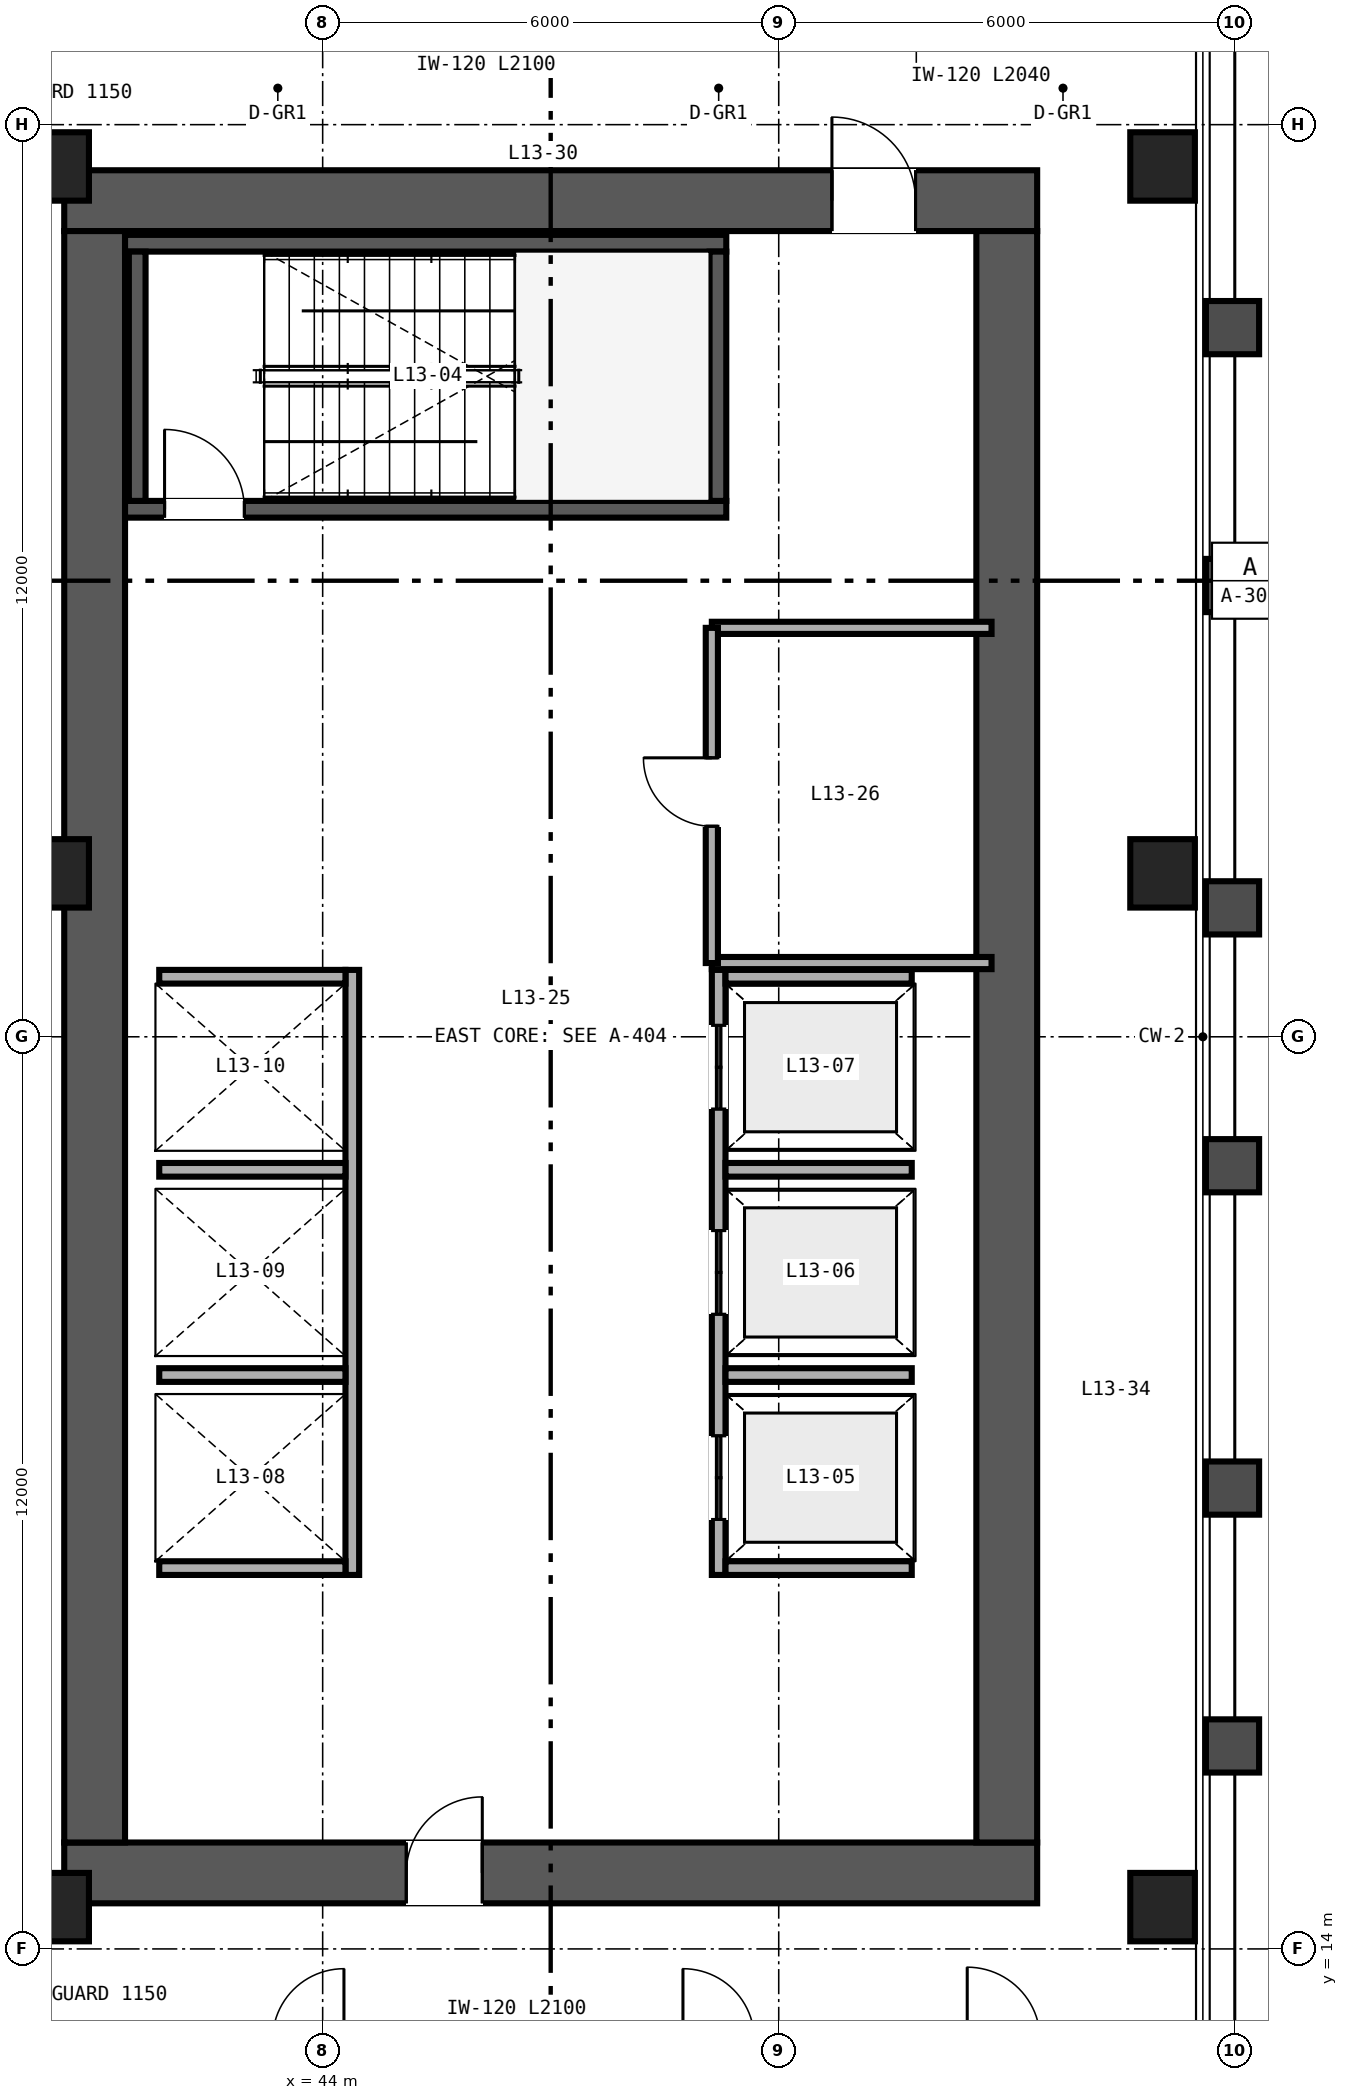
"""IFC4 building model, lengths in metres.
Left out: names, types, materials, properties, quantities, classifications, styles, units other than length and angle.
Written with IfcOpenShell. Run it as: python <this file> out.ifc"""

import sys

from ifc_helpers import new_model, si_unit, direction, frame, frame_2d, origin, origin_2d, place, context, subcontext, project, spatial, rectangle, hollow_rectangle, extrude, source, transform, mapped, element, fill, save


model = new_model("IFC4")
c1 = context("Model", 3, precision=1e-05, world=origin(), true_north=direction((0.0, 1.0)))
c2 = subcontext(c1, "Body", "Model", "MODEL_VIEW")
j1 = project(units=[si_unit("LENGTHUNIT", "METRE"), si_unit("PLANEANGLEUNIT", "RADIAN")], contexts=[c1])
p1 = place(None, origin())
s1 = spatial("IfcSite", under=j1, at=p1, CompositionType="ELEMENT")
p2 = place(p1, origin())
s2 = spatial("IfcBuilding", under=s1, at=p2, CompositionType="ELEMENT")
p3 = place(p2, frame((0.0, 0.0, 56.4)))
s3 = spatial("IfcBuildingStorey", under=s2, at=p3, CompositionType="ELEMENT", Elevation=56.4)
p4 = place(p3, frame((40.6, 15.0, 0.0), z_axis=(0.0, 0.0, 1.0), x_axis=(1.0, 0.0, 0.0)))
e1 = element("IfcWall", 1, at=p4, inside=s3, PredefinedType="SHEAR", context=c2, shape_type="SweptSolid", body=[
    extrude(rectangle(XDim=12.8, YDim=0.8, at=frame_2d((6.4, 0.0))), origin(), (0.0, 0.0, 1.0), 3.35),
])
p5 = place(p4, frame((4.5, 0.0, 0.0)))
e2 = element("IfcOpeningElement", 2, at=p5, cuts=e1, PredefinedType="OPENING", context=c2, shape_type="SweptSolid", body=[
    extrude(rectangle(XDim=1.0, YDim=2.15, at=frame_2d((0.5, 1.075))), frame((0.0, 0.41, 0.0), z_axis=(0.0, -1.0, 0.0), x_axis=(1.0, 0.0, 0.0)), (0.0, 0.0, 1.0), 0.82),
])
p6 = place(p3, frame((40.6, 37.0, 0.0), z_axis=(0.0, 0.0, 1.0), x_axis=(1.0, 0.0, 0.0)))
e3 = element("IfcWall", 3, at=p6, inside=s3, PredefinedType="SHEAR", context=c2, shape_type="SweptSolid", body=[
    extrude(rectangle(XDim=12.8, YDim=0.8, at=frame_2d((6.4, 0.0))), origin(), (0.0, 0.0, 1.0), 3.35),
])
p7 = place(p6, frame((10.1, 0.0, 0.0)))
e4 = element("IfcOpeningElement", 4, at=p7, cuts=e3, PredefinedType="OPENING", context=c2, shape_type="SweptSolid", body=[
    extrude(rectangle(XDim=1.1, YDim=2.15, at=frame_2d((0.55, 1.075))), frame((0.0, 0.41, 0.0), z_axis=(0.0, -1.0, 0.0), x_axis=(1.0, 0.0, 0.0)), (0.0, 0.0, 1.0), 0.82),
])
for number, where, z_axis, x_axis in (
    (5, (41.0, 15.4, 0.0), (0.0, 0.0, 1.0), (0.0, 1.0, 0.0)),
    (6, (53.0, 15.4, 0.0), (0.0, 0.0, 1.0), (0.0, 1.0, 0.0)),
):
    element("IfcWall", number, at=place(p3, frame(where, z_axis=z_axis, x_axis=x_axis)), inside=s3, PredefinedType="SHEAR", context=c2, shape_type="SweptSolid", body=[
        extrude(rectangle(XDim=21.2, YDim=0.8, at=frame_2d((10.6, 0.0))), origin(), (0.0, 0.0, 1.0), 3.35),
    ])
p8 = place(p3, frame((41.4, 32.94, 0.0), z_axis=(0.0, 0.0, 1.0), x_axis=(1.0, 0.0, 0.0)))
e7 = element("IfcWall", 7, at=p8, inside=s3, PredefinedType="SHEAR", context=c2, shape_type="SweptSolid", body=[
    extrude(rectangle(XDim=7.91, YDim=0.22, at=frame_2d((3.955, 0.0))), origin(), (0.0, 0.0, 1.0), 3.4),
])
p9 = place(p8, frame((0.52, 0.0, 0.0)))
e8 = element("IfcOpeningElement", 8, at=p9, cuts=e7, PredefinedType="OPENING", context=c2, shape_type="SweptSolid", body=[
    extrude(rectangle(XDim=1.05, YDim=2.15, at=frame_2d((0.525, 1.075))), frame((0.0, 0.12, 0.0), z_axis=(0.0, -1.0, 0.0), x_axis=(1.0, 0.0, 0.0)), (0.0, 0.0, 1.0), 0.24),
])
p10 = place(p3, frame((41.4, 36.44, 0.0), z_axis=(0.0, 0.0, 1.0), x_axis=(1.0, 0.0, 0.0)))
e9 = element("IfcWall", 9, at=p10, inside=s3, PredefinedType="SHEAR", context=c2, shape_type="SweptSolid", body=[
    extrude(rectangle(XDim=7.91, YDim=0.22, at=frame_2d((3.955, 0.0))), origin(), (0.0, 0.0, 1.0), 3.4),
])
for number, where, z_axis, x_axis in (
    (10, (41.56, 33.05, 0.0), (0.0, 0.0, 1.0), (0.0, 1.0, 0.0)),
    (11, (49.2, 33.05, 0.0), (0.0, 0.0, 1.0), (0.0, 1.0, 0.0)),
):
    element("IfcWall", number, at=place(p3, frame(where, z_axis=z_axis, x_axis=x_axis)), inside=s3, PredefinedType="SHEAR", context=c2, shape_type="SweptSolid", body=[
        extrude(rectangle(XDim=3.28, YDim=0.22, at=frame_2d((1.64, 0.0))), origin(), (0.0, 0.0, 1.0), 3.4),
    ])
m1 = source(origin(), c2, "Body", "SweptSolid", [
    extrude(hollow_rectangle(XDim=0.85, YDim=0.9, WallThickness=0.04, at=origin_2d()), origin(), (0.0, 0.0, 1.0), 3.35),
])
for number, where, z_axis, x_axis in (
    (12, (40.5, 14.55, 0.0), (0.0, 0.0, 1.0), (1.0, 0.0, 0.0)),
    (13, (55.05, 14.55, 0.0), (0.0, 0.0, 1.0), (1.0, 0.0, 0.0)),
    (14, (40.5, 28.15, 0.0), (0.0, 0.0, 1.0), (1.0, 0.0, 0.0)),
    (15, (55.05, 28.15, 0.0), (0.0, 0.0, 1.0), (1.0, 0.0, 0.0)),
    (16, (40.5, 37.45, 0.0), (0.0, 0.0, 1.0), (1.0, 0.0, 0.0)),
    (17, (55.05, 37.45, 0.0), (0.0, 0.0, 1.0), (1.0, 0.0, 0.0)),
):
    element("IfcColumn", number, at=place(p3, frame(where, z_axis=z_axis, x_axis=x_axis)), inside=s3, PredefinedType="COLUMN", context=c2, shape_type="MappedRepresentation", body=[
        mapped(m1, transform((0.0, 0.0, 0.0), scale=1.0)),
    ])
p11 = place(p3, frame((49.21, 18.92, 0.0), z_axis=(0.0, 0.0, 1.0), x_axis=(0.0, 1.0, 0.0)))
e18 = element("IfcWall", 18, at=p11, inside=s3, PredefinedType="SOLIDWALL", context=c2, shape_type="SweptSolid", body=[
    extrude(rectangle(XDim=7.96, YDim=0.18, at=frame_2d((3.98, 0.0))), origin(), (0.0, 0.0, 1.0), 3.35),
])
p12 = place(p11, frame((0.73, 0.0, 0.0)))
e19 = element("IfcOpeningElement", 19, at=p12, cuts=e18, PredefinedType="OPENING", context=c2, shape_type="SweptSolid", body=[
    extrude(rectangle(XDim=1.1, YDim=2.2, at=frame_2d((0.55, 1.1))), frame((0.0, 0.1, 0.0), z_axis=(0.0, -1.0, 0.0), x_axis=(1.0, 0.0, 0.0)), (0.0, 0.0, 1.0), 0.2),
])
p13 = place(p11, frame((3.43, 0.0, 0.0)))
e20 = element("IfcOpeningElement", 20, at=p13, cuts=e18, PredefinedType="OPENING", context=c2, shape_type="SweptSolid", body=[
    extrude(rectangle(XDim=1.1, YDim=2.2, at=frame_2d((0.55, 1.1))), frame((0.0, 0.1, 0.0), z_axis=(0.0, -1.0, 0.0), x_axis=(1.0, 0.0, 0.0)), (0.0, 0.0, 1.0), 0.2),
])
p14 = place(p11, frame((6.13, 0.0, 0.0)))
e21 = element("IfcOpeningElement", 21, at=p14, cuts=e18, PredefinedType="OPENING", context=c2, shape_type="SweptSolid", body=[
    extrude(rectangle(XDim=1.1, YDim=2.2, at=frame_2d((0.55, 1.1))), frame((0.0, 0.1, 0.0), z_axis=(0.0, -1.0, 0.0), x_axis=(1.0, 0.0, 0.0)), (0.0, 0.0, 1.0), 0.2),
])
for number, where, z_axis, x_axis in (
    (22, (49.3, 19.01, 0.0), (0.0, 0.0, 1.0), (1.0, 0.0, 0.0)),
    (23, (49.3, 26.79, 0.0), (0.0, 0.0, 1.0), (1.0, 0.0, 0.0)),
    (24, (49.3, 21.55, 0.0), (0.0, 0.0, 1.0), (1.0, 0.0, 0.0)),
    (25, (49.3, 24.25, 0.0), (0.0, 0.0, 1.0), (1.0, 0.0, 0.0)),
):
    element("IfcWall", number, at=place(p3, frame(where, z_axis=z_axis, x_axis=x_axis)), inside=s3, PredefinedType="SOLIDWALL", context=c2, shape_type="SweptSolid", body=[
        extrude(rectangle(XDim=2.45, YDim=0.18, at=frame_2d((1.225, 0.0))), origin(), (0.0, 0.0, 1.0), 3.35),
    ])
p15 = place(p3, frame((44.39, 18.92, 0.0), z_axis=(0.0, 0.0, 1.0), x_axis=(0.0, 1.0, 0.0)))
e26 = element("IfcWall", 26, at=p15, inside=s3, PredefinedType="SOLIDWALL", context=c2, shape_type="SweptSolid", body=[
    extrude(rectangle(XDim=7.96, YDim=0.18, at=frame_2d((3.98, 0.0))), origin(), (0.0, 0.0, 1.0), 3.35),
])
for number, where, z_axis, x_axis in (
    (27, (41.85, 19.01, 0.0), (0.0, 0.0, 1.0), (1.0, 0.0, 0.0)),
    (28, (41.85, 26.79, 0.0), (0.0, 0.0, 1.0), (1.0, 0.0, 0.0)),
    (29, (41.85, 21.55, 0.0), (0.0, 0.0, 1.0), (1.0, 0.0, 0.0)),
    (30, (41.85, 24.25, 0.0), (0.0, 0.0, 1.0), (1.0, 0.0, 0.0)),
):
    element("IfcWall", number, at=place(p3, frame(where, z_axis=z_axis, x_axis=x_axis)), inside=s3, PredefinedType="SOLIDWALL", context=c2, shape_type="SweptSolid", body=[
        extrude(rectangle(XDim=2.45, YDim=0.18, at=frame_2d((1.225, 0.0))), origin(), (0.0, 0.0, 1.0), 3.35),
    ])
p16 = place(p3, frame((49.12, 26.97, 0.0), z_axis=(0.0, 0.0, 1.0), x_axis=(1.0, 0.0, 0.0)))
e31 = element("IfcWall", 31, at=p16, inside=s3, PredefinedType="PARTITIONING", context=c2, shape_type="SweptSolid", body=[
    extrude(rectangle(XDim=3.68, YDim=0.16, at=frame_2d((1.84, 0.0))), origin(), (0.0, 0.0, 1.0), 3.35),
])
p17 = place(p3, frame((49.12, 31.38, 0.0), z_axis=(0.0, 0.0, 1.0), x_axis=(1.0, 0.0, 0.0)))
e32 = element("IfcWall", 32, at=p17, inside=s3, PredefinedType="PARTITIONING", context=c2, shape_type="SweptSolid", body=[
    extrude(rectangle(XDim=3.68, YDim=0.16, at=frame_2d((1.84, 0.0))), origin(), (0.0, 0.0, 1.0), 2.36),
])
p18 = place(p3, frame((49.12, 26.97, 0.0), z_axis=(0.0, 0.0, 1.0), x_axis=(0.0, 1.0, 0.0)))
e33 = element("IfcWall", 33, at=p18, inside=s3, PredefinedType="PARTITIONING", context=c2, shape_type="SweptSolid", body=[
    extrude(rectangle(XDim=4.41, YDim=0.16, at=frame_2d((2.205, 0.0))), origin(), (0.0, 0.0, 1.0), 2.36),
])
p19 = place(p18, frame((1.8, 0.0, 0.0)))
e34 = element("IfcOpeningElement", 34, at=p19, cuts=e33, PredefinedType="OPENING", context=c2, shape_type="SweptSolid", body=[
    extrude(rectangle(XDim=0.9, YDim=2.15, at=frame_2d((0.45, 1.075))), frame((0.0, 0.09, 0.0), z_axis=(0.0, -1.0, 0.0), x_axis=(1.0, 0.0, 0.0)), (0.0, 0.0, 1.0), 0.18),
])
m2 = source(origin(), c2, "Body", "SweptSolid", [
    extrude(rectangle(XDim=1.05, YDim=2.15, at=frame_2d((0.525, 1.075))), frame((0.0, 0.025, 0.0), z_axis=(0.0, -1.0, 0.0), x_axis=(1.0, 0.0, 0.0)), (0.0, 0.0, 1.0), 0.05),
])
p20 = place(p9, origin())
e35 = element("IfcDoor", 35, at=p20, inside=s3, OperationType="SINGLE_SWING_LEFT", PredefinedType="DOOR", context=c2, shape_type="MappedRepresentation", body=[
    mapped(m2, transform((0.0, 0.0, 0.0), scale=1.0)),
])
fill(e8, e35)
m3 = source(origin(), c2, "Body", "SweptSolid", [
    extrude(rectangle(XDim=1.1, YDim=2.2, at=frame_2d((0.55, 1.1))), frame((0.0, 0.025, 0.0), z_axis=(0.0, -1.0, 0.0), x_axis=(1.0, 0.0, 0.0)), (0.0, 0.0, 1.0), 0.05),
])
p21 = place(p12, origin())
e36 = element("IfcDoor", 36, at=p21, inside=s3, OperationType="DOUBLE_DOOR_SLIDING", PredefinedType="DOOR", context=c2, shape_type="MappedRepresentation", body=[
    mapped(m3, transform((0.0, 0.0, 0.0), scale=1.0)),
])
fill(e19, e36)
p22 = place(p13, origin())
e37 = element("IfcDoor", 37, at=p22, inside=s3, OperationType="DOUBLE_DOOR_SLIDING", PredefinedType="DOOR", context=c2, shape_type="MappedRepresentation", body=[
    mapped(m3, transform((0.0, 0.0, 0.0), scale=1.0)),
])
fill(e20, e37)
p23 = place(p14, origin())
e38 = element("IfcDoor", 38, at=p23, inside=s3, OperationType="DOUBLE_DOOR_SLIDING", PredefinedType="DOOR", context=c2, shape_type="MappedRepresentation", body=[
    mapped(m3, transform((0.0, 0.0, 0.0), scale=1.0)),
])
fill(e21, e38)
m4 = source(origin(), c2, "Body", "SweptSolid", [
    extrude(rectangle(XDim=1.0, YDim=2.15, at=frame_2d((0.5, 1.075))), frame((0.0, 0.025, 0.0), z_axis=(0.0, -1.0, 0.0), x_axis=(1.0, 0.0, 0.0)), (0.0, 0.0, 1.0), 0.05),
])
p24 = place(p5, origin())
e39 = element("IfcDoor", 39, at=p24, inside=s3, OperationType="SINGLE_SWING_RIGHT", PredefinedType="DOOR", context=c2, shape_type="MappedRepresentation", body=[
    mapped(m4, transform((0.0, 0.0, 0.0), scale=1.0)),
])
fill(e2, e39)
m5 = source(origin(), c2, "Body", "SweptSolid", [
    extrude(rectangle(XDim=1.1, YDim=2.15, at=frame_2d((0.55, 1.075))), frame((0.0, 0.025, 0.0), z_axis=(0.0, -1.0, 0.0), x_axis=(1.0, 0.0, 0.0)), (0.0, 0.0, 1.0), 0.05),
])
p25 = place(p7, origin())
e40 = element("IfcDoor", 40, at=p25, inside=s3, OperationType="SINGLE_SWING_LEFT", PredefinedType="DOOR", context=c2, shape_type="MappedRepresentation", body=[
    mapped(m5, transform((0.0, 0.0, 0.0), scale=1.0)),
])
fill(e4, e40)
m6 = source(origin(), c2, "Body", "SweptSolid", [
    extrude(rectangle(XDim=0.9, YDim=2.15, at=frame_2d((0.45, 1.075))), frame((0.0, 0.025, 0.0), z_axis=(0.0, -1.0, 0.0), x_axis=(1.0, 0.0, 0.0)), (0.0, 0.0, 1.0), 0.05),
])
p26 = place(p19, origin())
e41 = element("IfcDoor", 41, at=p26, inside=s3, OperationType="SINGLE_SWING_RIGHT", PredefinedType="DOOR", context=c2, shape_type="MappedRepresentation", body=[
    mapped(m6, transform((0.0, 0.0, 0.0), scale=1.0)),
])
fill(e34, e41)
save(model, sys.argv[1])
